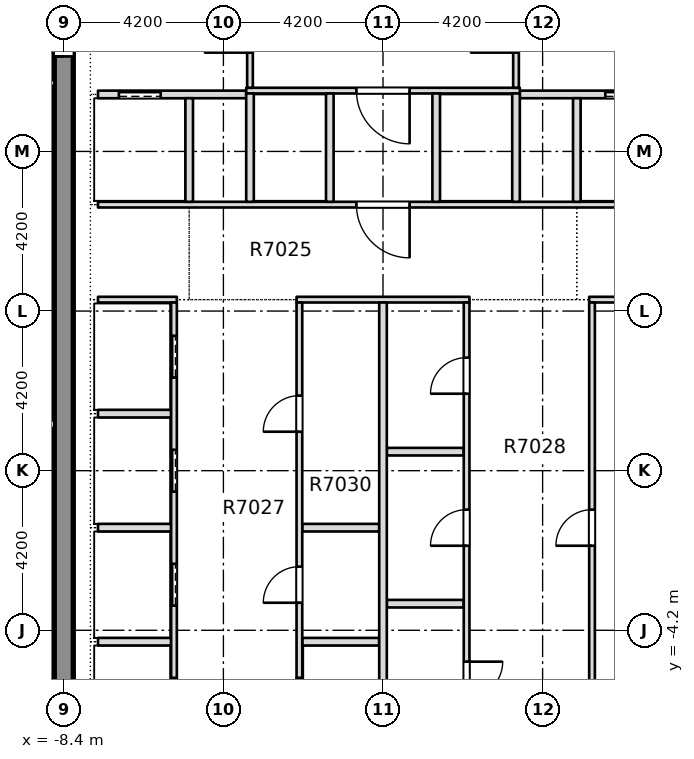
"""IFC4 building model, lengths in metres.
Left out: names, types, materials, properties, quantities, classifications, styles, units other than length and angle.
Written with IfcOpenShell. Run it as: python <this file> out.ifc"""

import sys

from ifc_helpers import new_model, si_unit, direction, frame, frame_2d, origin, place, context, subcontext, project, spatial, rectangle, extrude, element, fill, save


model = new_model("IFC4")
c1 = context("Model", 3, precision=1e-05, world=origin(), true_north=direction((0.0, 1.0)))
c2 = subcontext(c1, "Body", "Model", "MODEL_VIEW")
j1 = project(units=[si_unit("LENGTHUNIT", "METRE"), si_unit("PLANEANGLEUNIT", "RADIAN")], contexts=[c1])
p1 = place(None, origin())
s1 = spatial("IfcSite", under=j1, at=p1, CompositionType="ELEMENT")
p2 = place(p1, origin())
s2 = spatial("IfcBuilding", under=s1, at=p2, CompositionType="ELEMENT")
p3 = place(p2, frame((0.0, 0.0, 264.85)))
s3 = spatial("IfcBuildingStorey", under=s2, at=p3, CompositionType="ELEMENT", Elevation=264.85)
p4 = place(p3, frame((-8.4, -7.9, -0.5), z_axis=(0.0, 0.0, 1.0), x_axis=(0.0, 1.0, 0.0)))
e1 = element("IfcWall", 1, at=p4, inside=s3, PredefinedType="SHEAR", context=c2, shape_type="SweptSolid", body=[
    extrude(rectangle(XDim=29.15, YDim=0.5, at=frame_2d((14.575, 0.0))), origin(), (0.0, 0.0, 1.0), 4.5),
])
p5 = place(p4, frame((18.8, 0.0, 0.5)))
e2 = element("IfcOpeningElement", 2, at=p5, cuts=e1, PredefinedType="OPENING", context=c2, shape_type="SweptSolid", body=[
    extrude(rectangle(XDim=1.2, YDim=2.1, at=frame_2d((0.6, 1.05))), frame((0.0, 0.26, 0.0), z_axis=(0.0, -1.0, 0.0), x_axis=(1.0, 0.0, 0.0)), (0.0, 0.0, 1.0), 0.52),
])
p6 = place(p3, frame((-7.5, -4.5, 0.0), z_axis=(0.0, 0.0, 1.0), x_axis=(1.0, 0.0, 0.0)))
e3 = element("IfcWall", 3, at=p6, inside=s3, PredefinedType="PARTITIONING", context=c2, shape_type="SweptSolid", body=[
    extrude(rectangle(XDim=1.925, YDim=0.2, at=frame_2d((0.962, 0.0))), origin(), (0.0, 0.0, 1.0), 4.0),
])
for number, where, z_axis, x_axis in (
    (4, (-2.125, -4.5, 0.0), (0.0, 0.0, 1.0), (1.0, 0.0, 0.0)),
    (5, (0.1, -3.5, 0.0), (0.0, 0.0, 1.0), (1.0, 0.0, 0.0)),
):
    element("IfcWall", number, at=place(p3, frame(where, z_axis=z_axis, x_axis=x_axis)), inside=s3, PredefinedType="PARTITIONING", context=c2, shape_type="SweptSolid", body=[
        extrude(rectangle(XDim=2.025, YDim=0.2, at=frame_2d((1.012, 0.0))), origin(), (0.0, 0.0, 1.0), 4.0),
    ])
p7 = place(p3, frame((-7.5, -1.5, 0.0), z_axis=(0.0, 0.0, 1.0), x_axis=(1.0, 0.0, 0.0)))
e6 = element("IfcWall", 6, at=p7, inside=s3, PredefinedType="PARTITIONING", context=c2, shape_type="SweptSolid", body=[
    extrude(rectangle(XDim=1.925, YDim=0.2, at=frame_2d((0.962, 0.0))), origin(), (0.0, 0.0, 1.0), 4.0),
])
for number, where, z_axis, x_axis in (
    (7, (-2.125, -1.5, 0.0), (0.0, 0.0, 1.0), (1.0, 0.0, 0.0)),
    (8, (0.1, 0.5, 0.0), (0.0, 0.0, 1.0), (1.0, 0.0, 0.0)),
):
    element("IfcWall", number, at=place(p3, frame(where, z_axis=z_axis, x_axis=x_axis)), inside=s3, PredefinedType="PARTITIONING", context=c2, shape_type="SweptSolid", body=[
        extrude(rectangle(XDim=2.025, YDim=0.2, at=frame_2d((1.012, 0.0))), origin(), (0.0, 0.0, 1.0), 4.0),
    ])
p8 = place(p3, frame((-7.5, 1.5, 0.0), z_axis=(0.0, 0.0, 1.0), x_axis=(1.0, 0.0, 0.0)))
e9 = element("IfcWall", 9, at=p8, inside=s3, PredefinedType="PARTITIONING", context=c2, shape_type="SweptSolid", body=[
    extrude(rectangle(XDim=1.925, YDim=0.2, at=frame_2d((0.962, 0.0))), origin(), (0.0, 0.0, 1.0), 4.0),
])
p9 = place(p3, frame((-7.5, 4.5, 0.0), z_axis=(0.0, 0.0, 1.0), x_axis=(1.0, 0.0, 0.0)))
e10 = element("IfcWall", 10, at=p9, inside=s3, PredefinedType="PARTITIONING", context=c2, shape_type="SweptSolid", body=[
    extrude(rectangle(XDim=2.075, YDim=0.15, at=frame_2d((1.038, 0.0))), origin(), (0.0, 0.0, 1.0), 2.5),
])
p10 = place(p3, frame((-2.275, 4.5, 0.0), z_axis=(0.0, 0.0, 1.0), x_axis=(1.0, 0.0, 0.0)))
e11 = element("IfcWall", 11, at=p10, inside=s3, PredefinedType="PARTITIONING", context=c2, shape_type="SweptSolid", body=[
    extrude(rectangle(XDim=4.55, YDim=0.15, at=frame_2d((2.275, 0.0))), origin(), (0.0, 0.0, 1.0), 2.5),
])
p11 = place(p3, frame((5.425, 4.5, 0.0), z_axis=(0.0, 0.0, 1.0), x_axis=(1.0, 0.0, 0.0)))
e12 = element("IfcWall", 12, at=p11, inside=s3, PredefinedType="PARTITIONING", context=c2, shape_type="SweptSolid", body=[
    extrude(rectangle(XDim=2.075, YDim=0.15, at=frame_2d((1.038, 0.0))), origin(), (0.0, 0.0, 1.0), 2.5),
])
p12 = place(p3, frame((-7.5, 7.0, 0.0), z_axis=(0.0, 0.0, 1.0), x_axis=(1.0, 0.0, 0.0)))
e13 = element("IfcWall", 13, at=p12, inside=s3, PredefinedType="PARTITIONING", context=c2, shape_type="SweptSolid", body=[
    extrude(rectangle(XDim=15.0, YDim=0.15, at=frame_2d((7.5, 0.0))), origin(), (0.0, 0.0, 1.0), 4.0),
])
p13 = place(p12, frame((6.8, 0.0, 0.0)))
e14 = element("IfcOpeningElement", 14, at=p13, cuts=e13, PredefinedType="OPENING", context=c2, shape_type="SweptSolid", body=[
    extrude(rectangle(XDim=1.4, YDim=2.1, at=frame_2d((0.7, 1.05))), frame((0.0, 0.085, 0.0), z_axis=(0.0, -1.0, 0.0), x_axis=(1.0, 0.0, 0.0)), (0.0, 0.0, 1.0), 0.17),
])
p14 = place(p3, frame((-7.5, 9.9, 0.0), z_axis=(0.0, 0.0, 1.0), x_axis=(1.0, 0.0, 0.0)))
e15 = element("IfcWall", 15, at=p14, inside=s3, PredefinedType="PARTITIONING", context=c2, shape_type="SweptSolid", body=[
    extrude(rectangle(XDim=3.9, YDim=0.2, at=frame_2d((1.95, 0.0))), origin(), (0.0, 0.0, 1.0), 4.0),
])
p15 = place(p14, frame((0.55, 0.0, 0.0)))
e16 = element("IfcOpeningElement", 16, at=p15, cuts=e15, PredefinedType="OPENING", context=c2, shape_type="SweptSolid", body=[
    extrude(rectangle(XDim=1.1, YDim=2.1, at=frame_2d((0.55, 1.05))), frame((0.0, 0.11, 0.0), z_axis=(0.0, -1.0, 0.0), x_axis=(1.0, 0.0, 0.0)), (0.0, 0.0, 1.0), 0.22),
])
p16 = place(p3, frame((3.6, 9.9, 0.0), z_axis=(0.0, 0.0, 1.0), x_axis=(1.0, 0.0, 0.0)))
e17 = element("IfcWall", 17, at=p16, inside=s3, PredefinedType="PARTITIONING", context=c2, shape_type="SweptSolid", body=[
    extrude(rectangle(XDim=3.9, YDim=0.2, at=frame_2d((1.95, 0.0))), origin(), (0.0, 0.0, 1.0), 4.0),
])
p17 = place(p16, frame((2.25, 0.0, 0.0)))
e18 = element("IfcOpeningElement", 18, at=p17, cuts=e17, PredefinedType="OPENING", context=c2, shape_type="SweptSolid", body=[
    extrude(rectangle(XDim=1.1, YDim=2.1, at=frame_2d((0.55, 1.05))), frame((0.0, 0.11, 0.0), z_axis=(0.0, -1.0, 0.0), x_axis=(1.0, 0.0, 0.0)), (0.0, 0.0, 1.0), 0.22),
])
p18 = place(p3, frame((-3.6, 10.0, 0.0), z_axis=(0.0, 0.0, 1.0), x_axis=(1.0, 0.0, 0.0)))
e19 = element("IfcWall", 19, at=p18, inside=s3, PredefinedType="PARTITIONING", context=c2, shape_type="SweptSolid", body=[
    extrude(rectangle(XDim=7.2, YDim=0.15, at=frame_2d((3.6, 0.0))), origin(), (0.0, 0.0, 1.0), 4.0),
])
p19 = place(p18, frame((2.9, 0.0, 0.0)))
e20 = element("IfcOpeningElement", 20, at=p19, cuts=e19, PredefinedType="OPENING", context=c2, shape_type="SweptSolid", body=[
    extrude(rectangle(XDim=1.4, YDim=2.1, at=frame_2d((0.7, 1.05))), frame((0.0, 0.085, 0.0), z_axis=(0.0, -1.0, 0.0), x_axis=(1.0, 0.0, 0.0)), (0.0, 0.0, 1.0), 0.17),
])
p20 = place(p3, frame((-5.5, -7.899, 0.0), z_axis=(0.0, 0.0, 1.0), x_axis=(0.0, 1.0, 0.0)))
e21 = element("IfcWall", 21, at=p20, inside=s3, PredefinedType="PARTITIONING", context=c2, shape_type="SweptSolid", body=[
    extrude(rectangle(XDim=12.324, YDim=0.15, at=frame_2d((6.162, 0.0))), origin(), (0.0, 0.0, 1.0), 4.0),
])
p21 = place(p20, frame((1.349, 0.0, 0.0)))
e22 = element("IfcOpeningElement", 22, at=p21, cuts=e21, PredefinedType="OPENING", context=c2, shape_type="SweptSolid", body=[
    extrude(rectangle(XDim=1.1, YDim=2.1, at=frame_2d((0.55, 1.05))), frame((0.0, 0.085, 0.0), z_axis=(0.0, -1.0, 0.0), x_axis=(1.0, 0.0, 0.0)), (0.0, 0.0, 1.0), 0.17),
])
p22 = place(p20, frame((4.349, 0.0, 0.0)))
e23 = element("IfcOpeningElement", 23, at=p22, cuts=e21, PredefinedType="OPENING", context=c2, shape_type="SweptSolid", body=[
    extrude(rectangle(XDim=1.1, YDim=2.1, at=frame_2d((0.55, 1.05))), frame((0.0, 0.085, 0.0), z_axis=(0.0, -1.0, 0.0), x_axis=(1.0, 0.0, 0.0)), (0.0, 0.0, 1.0), 0.17),
])
p23 = place(p20, frame((7.349, 0.0, 0.0)))
e24 = element("IfcOpeningElement", 24, at=p23, cuts=e21, PredefinedType="OPENING", context=c2, shape_type="SweptSolid", body=[
    extrude(rectangle(XDim=1.1, YDim=2.1, at=frame_2d((0.55, 1.05))), frame((0.0, 0.085, 0.0), z_axis=(0.0, -1.0, 0.0), x_axis=(1.0, 0.0, 0.0)), (0.0, 0.0, 1.0), 0.17),
])
p24 = place(p20, frame((10.349, 0.0, 0.0)))
e25 = element("IfcOpeningElement", 25, at=p24, cuts=e21, PredefinedType="OPENING", context=c2, shape_type="SweptSolid", body=[
    extrude(rectangle(XDim=1.1, YDim=2.1, at=frame_2d((0.55, 1.05))), frame((0.0, 0.085, 0.0), z_axis=(0.0, -1.0, 0.0), x_axis=(1.0, 0.0, 0.0)), (0.0, 0.0, 1.0), 0.17),
])
p25 = place(p3, frame((-5.1, 7.075, 0.0), z_axis=(0.0, 0.0, 1.0), x_axis=(0.0, 1.0, 0.0)))
e26 = element("IfcWall", 26, at=p25, inside=s3, PredefinedType="PARTITIONING", context=c2, shape_type="SweptSolid", body=[
    extrude(rectangle(XDim=2.725, YDim=0.2, at=frame_2d((1.363, 0.0))), origin(), (0.0, 0.0, 1.0), 4.0),
])
p26 = place(p3, frame((-3.5, 7.075, 0.0), z_axis=(0.0, 0.0, 1.0), x_axis=(0.0, 1.0, 0.0)))
e27 = element("IfcWall", 27, at=p26, inside=s3, PredefinedType="PARTITIONING", context=c2, shape_type="SweptSolid", body=[
    extrude(rectangle(XDim=2.85, YDim=0.2, at=frame_2d((1.425, 0.0))), origin(), (0.0, 0.0, 1.0), 4.0),
])
p27 = place(p3, frame((-3.5, 10.075, 0.0), z_axis=(0.0, 0.0, 1.0), x_axis=(0.0, 1.0, 0.0)))
e28 = element("IfcWall", 28, at=p27, inside=s3, PredefinedType="PARTITIONING", context=c2, shape_type="SweptSolid", body=[
    extrude(rectangle(XDim=3.075, YDim=0.15, at=frame_2d((1.538, 0.0))), origin(), (0.0, 0.0, 1.0), 4.0),
])
p28 = place(p27, frame((0.925, 0.0, 0.0)))
e29 = element("IfcOpeningElement", 29, at=p28, cuts=e28, PredefinedType="OPENING", context=c2, shape_type="SweptSolid", body=[
    extrude(rectangle(XDim=1.2, YDim=2.1, at=frame_2d((0.6, 1.05))), frame((0.0, 0.085, 0.0), z_axis=(0.0, -1.0, 0.0), x_axis=(1.0, 0.0, 0.0)), (0.0, 0.0, 1.0), 0.17),
])
p29 = place(p3, frame((-2.2, -7.899, 0.0), z_axis=(0.0, 0.0, 1.0), x_axis=(0.0, 1.0, 0.0)))
e30 = element("IfcWall", 30, at=p29, inside=s3, PredefinedType="PARTITIONING", context=c2, shape_type="SweptSolid", body=[
    extrude(rectangle(XDim=12.324, YDim=0.15, at=frame_2d((6.162, 0.0))), origin(), (0.0, 0.0, 1.0), 4.0),
])
p30 = place(p29, frame((1.349, 0.0, 0.0)))
e31 = element("IfcOpeningElement", 31, at=p30, cuts=e30, PredefinedType="OPENING", context=c2, shape_type="SweptSolid", body=[
    extrude(rectangle(XDim=1.1, YDim=2.1, at=frame_2d((0.55, 1.05))), frame((0.0, 0.085, 0.0), z_axis=(0.0, -1.0, 0.0), x_axis=(1.0, 0.0, 0.0)), (0.0, 0.0, 1.0), 0.17),
])
p31 = place(p29, frame((4.424, 0.0, 0.0)))
e32 = element("IfcOpeningElement", 32, at=p31, cuts=e30, PredefinedType="OPENING", context=c2, shape_type="SweptSolid", body=[
    extrude(rectangle(XDim=0.95, YDim=2.1, at=frame_2d((0.475, 1.05))), frame((0.0, 0.085, 0.0), z_axis=(0.0, -1.0, 0.0), x_axis=(1.0, 0.0, 0.0)), (0.0, 0.0, 1.0), 0.17),
])
p32 = place(p29, frame((8.924, 0.0, 0.0)))
e33 = element("IfcOpeningElement", 33, at=p32, cuts=e30, PredefinedType="OPENING", context=c2, shape_type="SweptSolid", body=[
    extrude(rectangle(XDim=0.95, YDim=2.1, at=frame_2d((0.475, 1.05))), frame((0.0, 0.085, 0.0), z_axis=(0.0, -1.0, 0.0), x_axis=(1.0, 0.0, 0.0)), (0.0, 0.0, 1.0), 0.17),
])
p33 = place(p3, frame((-1.4, 7.075, 0.0), z_axis=(0.0, 0.0, 1.0), x_axis=(0.0, 1.0, 0.0)))
e34 = element("IfcWall", 34, at=p33, inside=s3, PredefinedType="PARTITIONING", context=c2, shape_type="SweptSolid", body=[
    extrude(rectangle(XDim=2.85, YDim=0.2, at=frame_2d((1.425, 0.0))), origin(), (0.0, 0.0, 1.0), 4.0),
])
p34 = place(p3, frame((0.0, -7.899, 0.0), z_axis=(0.0, 0.0, 1.0), x_axis=(0.0, 1.0, 0.0)))
e35 = element("IfcWall", 35, at=p34, inside=s3, PredefinedType="PARTITIONING", context=c2, shape_type="SweptSolid", body=[
    extrude(rectangle(XDim=12.324, YDim=0.2, at=frame_2d((6.162, 0.0))), origin(), (0.0, 0.0, 1.0), 4.0),
])
p35 = place(p3, frame((1.4, 7.075, 0.0), z_axis=(0.0, 0.0, 1.0), x_axis=(0.0, 1.0, 0.0)))
e36 = element("IfcWall", 36, at=p35, inside=s3, PredefinedType="PARTITIONING", context=c2, shape_type="SweptSolid", body=[
    extrude(rectangle(XDim=2.85, YDim=0.2, at=frame_2d((1.425, 0.0))), origin(), (0.0, 0.0, 1.0), 4.0),
])
p36 = place(p3, frame((2.2, -7.899, 0.0), z_axis=(0.0, 0.0, 1.0), x_axis=(0.0, 1.0, 0.0)))
e37 = element("IfcWall", 37, at=p36, inside=s3, PredefinedType="PARTITIONING", context=c2, shape_type="SweptSolid", body=[
    extrude(rectangle(XDim=12.324, YDim=0.15, at=frame_2d((6.162, 0.0))), origin(), (0.0, 0.0, 1.0), 4.0),
])
p37 = place(p36, frame((1.924, 0.0, 0.0)))
e38 = element("IfcOpeningElement", 38, at=p37, cuts=e37, PredefinedType="OPENING", context=c2, shape_type="SweptSolid", body=[
    extrude(rectangle(XDim=0.95, YDim=2.1, at=frame_2d((0.475, 1.05))), frame((0.0, 0.085, 0.0), z_axis=(0.0, -1.0, 0.0), x_axis=(1.0, 0.0, 0.0)), (0.0, 0.0, 1.0), 0.17),
])
p38 = place(p36, frame((5.924, 0.0, 0.0)))
e39 = element("IfcOpeningElement", 39, at=p38, cuts=e37, PredefinedType="OPENING", context=c2, shape_type="SweptSolid", body=[
    extrude(rectangle(XDim=0.95, YDim=2.1, at=frame_2d((0.475, 1.05))), frame((0.0, 0.085, 0.0), z_axis=(0.0, -1.0, 0.0), x_axis=(1.0, 0.0, 0.0)), (0.0, 0.0, 1.0), 0.17),
])
p39 = place(p36, frame((9.924, 0.0, 0.0)))
e40 = element("IfcOpeningElement", 40, at=p39, cuts=e37, PredefinedType="OPENING", context=c2, shape_type="SweptSolid", body=[
    extrude(rectangle(XDim=0.95, YDim=2.1, at=frame_2d((0.475, 1.05))), frame((0.0, 0.085, 0.0), z_axis=(0.0, -1.0, 0.0), x_axis=(1.0, 0.0, 0.0)), (0.0, 0.0, 1.0), 0.17),
])
p40 = place(p3, frame((3.5, 7.075, 0.0), z_axis=(0.0, 0.0, 1.0), x_axis=(0.0, 1.0, 0.0)))
e41 = element("IfcWall", 41, at=p40, inside=s3, PredefinedType="PARTITIONING", context=c2, shape_type="SweptSolid", body=[
    extrude(rectangle(XDim=2.85, YDim=0.2, at=frame_2d((1.425, 0.0))), origin(), (0.0, 0.0, 1.0), 4.0),
])
p41 = place(p3, frame((3.5, 10.075, 0.0), z_axis=(0.0, 0.0, 1.0), x_axis=(0.0, 1.0, 0.0)))
e42 = element("IfcWall", 42, at=p41, inside=s3, PredefinedType="PARTITIONING", context=c2, shape_type="SweptSolid", body=[
    extrude(rectangle(XDim=3.075, YDim=0.15, at=frame_2d((1.538, 0.0))), origin(), (0.0, 0.0, 1.0), 4.0),
])
p42 = place(p41, frame((0.925, 0.0, 0.0)))
e43 = element("IfcOpeningElement", 43, at=p42, cuts=e42, PredefinedType="OPENING", context=c2, shape_type="SweptSolid", body=[
    extrude(rectangle(XDim=1.2, YDim=2.1, at=frame_2d((0.6, 1.05))), frame((0.0, 0.085, 0.0), z_axis=(0.0, -1.0, 0.0), x_axis=(1.0, 0.0, 0.0)), (0.0, 0.0, 1.0), 0.17),
])
p43 = place(p3, frame((5.1, 7.075, 0.0), z_axis=(0.0, 0.0, 1.0), x_axis=(0.0, 1.0, 0.0)))
e44 = element("IfcWall", 44, at=p43, inside=s3, PredefinedType="PARTITIONING", context=c2, shape_type="SweptSolid", body=[
    extrude(rectangle(XDim=2.725, YDim=0.2, at=frame_2d((1.363, 0.0))), origin(), (0.0, 0.0, 1.0), 4.0),
])
p44 = place(p3, frame((5.5, -7.899, 0.0), z_axis=(0.0, 0.0, 1.0), x_axis=(0.0, 1.0, 0.0)))
e45 = element("IfcWall", 45, at=p44, inside=s3, PredefinedType="PARTITIONING", context=c2, shape_type="SweptSolid", body=[
    extrude(rectangle(XDim=12.324, YDim=0.15, at=frame_2d((6.162, 0.0))), origin(), (0.0, 0.0, 1.0), 4.0),
])
p45 = place(p44, frame((5.924, 0.0, 0.0)))
e46 = element("IfcOpeningElement", 46, at=p45, cuts=e45, PredefinedType="OPENING", context=c2, shape_type="SweptSolid", body=[
    extrude(rectangle(XDim=0.95, YDim=2.1, at=frame_2d((0.475, 1.05))), frame((0.0, 0.085, 0.0), z_axis=(0.0, -1.0, 0.0), x_axis=(1.0, 0.0, 0.0)), (0.0, 0.0, 1.0), 0.17),
])
p46 = place(p3, frame((-12.099, 1.225, 0.0), z_axis=(0.0, 0.0, 1.0), x_axis=(1.0, 0.0, 0.0)))
e47 = element("IfcWall", 47, at=p46, inside=s3, PredefinedType="PARTITIONING", context=c2, shape_type="SweptSolid", body=[
    extrude(rectangle(XDim=3.448, YDim=0.2, at=frame_2d((1.724, 0.0))), origin(), (0.0, 0.0, 1.0), 4.0),
])
p47 = place(p3, frame((-12.099, 10.2, 0.0), z_axis=(0.0, 0.0, 1.0), x_axis=(1.0, 0.0, 0.0)))
e48 = element("IfcWall", 48, at=p47, inside=s3, PredefinedType="PARTITIONING", context=c2, shape_type="SweptSolid", body=[
    extrude(rectangle(XDim=3.448, YDim=0.15, at=frame_2d((1.724, 0.0))), origin(), (0.0, 0.0, 1.0), 4.0),
])
p48 = place(p21, origin())
e49 = element("IfcDoor", 49, at=p48, inside=s3, OperationType="SLIDING_TO_LEFT", PredefinedType="DOOR", context=c2, shape_type="SweptSolid", body=[
    extrude(rectangle(XDim=1.1, YDim=2.1, at=frame_2d((0.55, 1.05))), frame((0.0, 0.025, 0.0), z_axis=(0.0, -1.0, 0.0), x_axis=(1.0, 0.0, 0.0)), (0.0, 0.0, 1.0), 0.05),
])
fill(e22, e49)
p49 = place(p22, origin())
e50 = element("IfcDoor", 50, at=p49, inside=s3, OperationType="SLIDING_TO_LEFT", PredefinedType="DOOR", context=c2, shape_type="SweptSolid", body=[
    extrude(rectangle(XDim=1.1, YDim=2.1, at=frame_2d((0.55, 1.05))), frame((0.0, 0.025, 0.0), z_axis=(0.0, -1.0, 0.0), x_axis=(1.0, 0.0, 0.0)), (0.0, 0.0, 1.0), 0.05),
])
fill(e23, e50)
p50 = place(p23, origin())
e51 = element("IfcDoor", 51, at=p50, inside=s3, OperationType="SLIDING_TO_LEFT", PredefinedType="DOOR", context=c2, shape_type="SweptSolid", body=[
    extrude(rectangle(XDim=1.1, YDim=2.1, at=frame_2d((0.55, 1.05))), frame((0.0, 0.025, 0.0), z_axis=(0.0, -1.0, 0.0), x_axis=(1.0, 0.0, 0.0)), (0.0, 0.0, 1.0), 0.05),
])
fill(e24, e51)
p51 = place(p24, origin())
e52 = element("IfcDoor", 52, at=p51, inside=s3, OperationType="SLIDING_TO_LEFT", PredefinedType="DOOR", context=c2, shape_type="SweptSolid", body=[
    extrude(rectangle(XDim=1.1, YDim=2.1, at=frame_2d((0.55, 1.05))), frame((0.0, 0.025, 0.0), z_axis=(0.0, -1.0, 0.0), x_axis=(1.0, 0.0, 0.0)), (0.0, 0.0, 1.0), 0.05),
])
fill(e25, e52)
p52 = place(p30, origin())
e53 = element("IfcDoor", 53, at=p52, inside=s3, OperationType="SLIDING_TO_LEFT", PredefinedType="DOOR", context=c2, shape_type="SweptSolid", body=[
    extrude(rectangle(XDim=1.1, YDim=2.1, at=frame_2d((0.55, 1.05))), frame((0.0, 0.025, 0.0), z_axis=(0.0, -1.0, 0.0), x_axis=(1.0, 0.0, 0.0)), (0.0, 0.0, 1.0), 0.05),
])
fill(e31, e53)
p53 = place(p31, origin())
e54 = element("IfcDoor", 54, at=p53, inside=s3, OperationType="SINGLE_SWING_RIGHT", PredefinedType="DOOR", context=c2, shape_type="SweptSolid", body=[
    extrude(rectangle(XDim=0.95, YDim=2.1, at=frame_2d((0.475, 1.05))), frame((0.0, 0.025, 0.0), z_axis=(0.0, -1.0, 0.0), x_axis=(1.0, 0.0, 0.0)), (0.0, 0.0, 1.0), 0.05),
])
fill(e32, e54)
p54 = place(p32, origin())
e55 = element("IfcDoor", 55, at=p54, inside=s3, OperationType="SINGLE_SWING_LEFT", PredefinedType="DOOR", context=c2, shape_type="SweptSolid", body=[
    extrude(rectangle(XDim=0.95, YDim=2.1, at=frame_2d((0.475, 1.05))), frame((0.0, 0.025, 0.0), z_axis=(0.0, -1.0, 0.0), x_axis=(1.0, 0.0, 0.0)), (0.0, 0.0, 1.0), 0.05),
])
fill(e33, e55)
p55 = place(p37, origin())
e56 = element("IfcDoor", 56, at=p55, inside=s3, OperationType="SINGLE_SWING_RIGHT", PredefinedType="DOOR", context=c2, shape_type="SweptSolid", body=[
    extrude(rectangle(XDim=0.95, YDim=2.1, at=frame_2d((0.475, 1.05))), frame((0.0, 0.025, 0.0), z_axis=(0.0, -1.0, 0.0), x_axis=(1.0, 0.0, 0.0)), (0.0, 0.0, 1.0), 0.05),
])
fill(e38, e56)
p56 = place(p38, origin())
e57 = element("IfcDoor", 57, at=p56, inside=s3, OperationType="SINGLE_SWING_RIGHT", PredefinedType="DOOR", context=c2, shape_type="SweptSolid", body=[
    extrude(rectangle(XDim=0.95, YDim=2.1, at=frame_2d((0.475, 1.05))), frame((0.0, 0.025, 0.0), z_axis=(0.0, -1.0, 0.0), x_axis=(1.0, 0.0, 0.0)), (0.0, 0.0, 1.0), 0.05),
])
fill(e39, e57)
p57 = place(p39, origin())
e58 = element("IfcDoor", 58, at=p57, inside=s3, OperationType="SINGLE_SWING_LEFT", PredefinedType="DOOR", context=c2, shape_type="SweptSolid", body=[
    extrude(rectangle(XDim=0.95, YDim=2.1, at=frame_2d((0.475, 1.05))), frame((0.0, 0.025, 0.0), z_axis=(0.0, -1.0, 0.0), x_axis=(1.0, 0.0, 0.0)), (0.0, 0.0, 1.0), 0.05),
])
fill(e40, e58)
p58 = place(p45, origin())
e59 = element("IfcDoor", 59, at=p58, inside=s3, OperationType="SINGLE_SWING_LEFT", PredefinedType="DOOR", context=c2, shape_type="SweptSolid", body=[
    extrude(rectangle(XDim=0.95, YDim=2.1, at=frame_2d((0.475, 1.05))), frame((0.0, 0.025, 0.0), z_axis=(0.0, -1.0, 0.0), x_axis=(1.0, 0.0, 0.0)), (0.0, 0.0, 1.0), 0.05),
])
fill(e46, e59)
p59 = place(p15, origin())
e60 = element("IfcDoor", 60, at=p59, inside=s3, OperationType="SLIDING_TO_RIGHT", PredefinedType="DOOR", context=c2, shape_type="SweptSolid", body=[
    extrude(rectangle(XDim=1.1, YDim=2.1, at=frame_2d((0.55, 1.05))), frame((0.0, 0.025, 0.0), z_axis=(0.0, -1.0, 0.0), x_axis=(1.0, 0.0, 0.0)), (0.0, 0.0, 1.0), 0.05),
])
fill(e16, e60)
p60 = place(p17, origin())
e61 = element("IfcDoor", 61, at=p60, inside=s3, OperationType="SLIDING_TO_LEFT", PredefinedType="DOOR", context=c2, shape_type="SweptSolid", body=[
    extrude(rectangle(XDim=1.1, YDim=2.1, at=frame_2d((0.55, 1.05))), frame((0.0, 0.025, 0.0), z_axis=(0.0, -1.0, 0.0), x_axis=(1.0, 0.0, 0.0)), (0.0, 0.0, 1.0), 0.05),
])
fill(e18, e61)
p61 = place(p13, origin())
e62 = element("IfcDoor", 62, at=p61, inside=s3, OperationType="SINGLE_SWING_RIGHT", PredefinedType="DOOR", context=c2, shape_type="SweptSolid", body=[
    extrude(rectangle(XDim=1.4, YDim=2.1, at=frame_2d((0.7, 1.05))), frame((0.0, 0.025, 0.0), z_axis=(0.0, -1.0, 0.0), x_axis=(1.0, 0.0, 0.0)), (0.0, 0.0, 1.0), 0.05),
])
fill(e14, e62)
p62 = place(p19, origin())
e63 = element("IfcDoor", 63, at=p62, inside=s3, OperationType="SINGLE_SWING_RIGHT", PredefinedType="DOOR", context=c2, shape_type="SweptSolid", body=[
    extrude(rectangle(XDim=1.4, YDim=2.1, at=frame_2d((0.7, 1.05))), frame((0.0, 0.025, 0.0), z_axis=(0.0, -1.0, 0.0), x_axis=(1.0, 0.0, 0.0)), (0.0, 0.0, 1.0), 0.05),
])
fill(e20, e63)
p63 = place(p5, origin())
e64 = element("IfcDoor", 64, at=p63, inside=s3, OperationType="SINGLE_SWING_LEFT", PredefinedType="DOOR", context=c2, shape_type="SweptSolid", body=[
    extrude(rectangle(XDim=1.2, YDim=2.1, at=frame_2d((0.6, 1.05))), frame((0.0, 0.025, 0.0), z_axis=(0.0, -1.0, 0.0), x_axis=(1.0, 0.0, 0.0)), (0.0, 0.0, 1.0), 0.05),
])
fill(e2, e64)
save(model, sys.argv[1])
